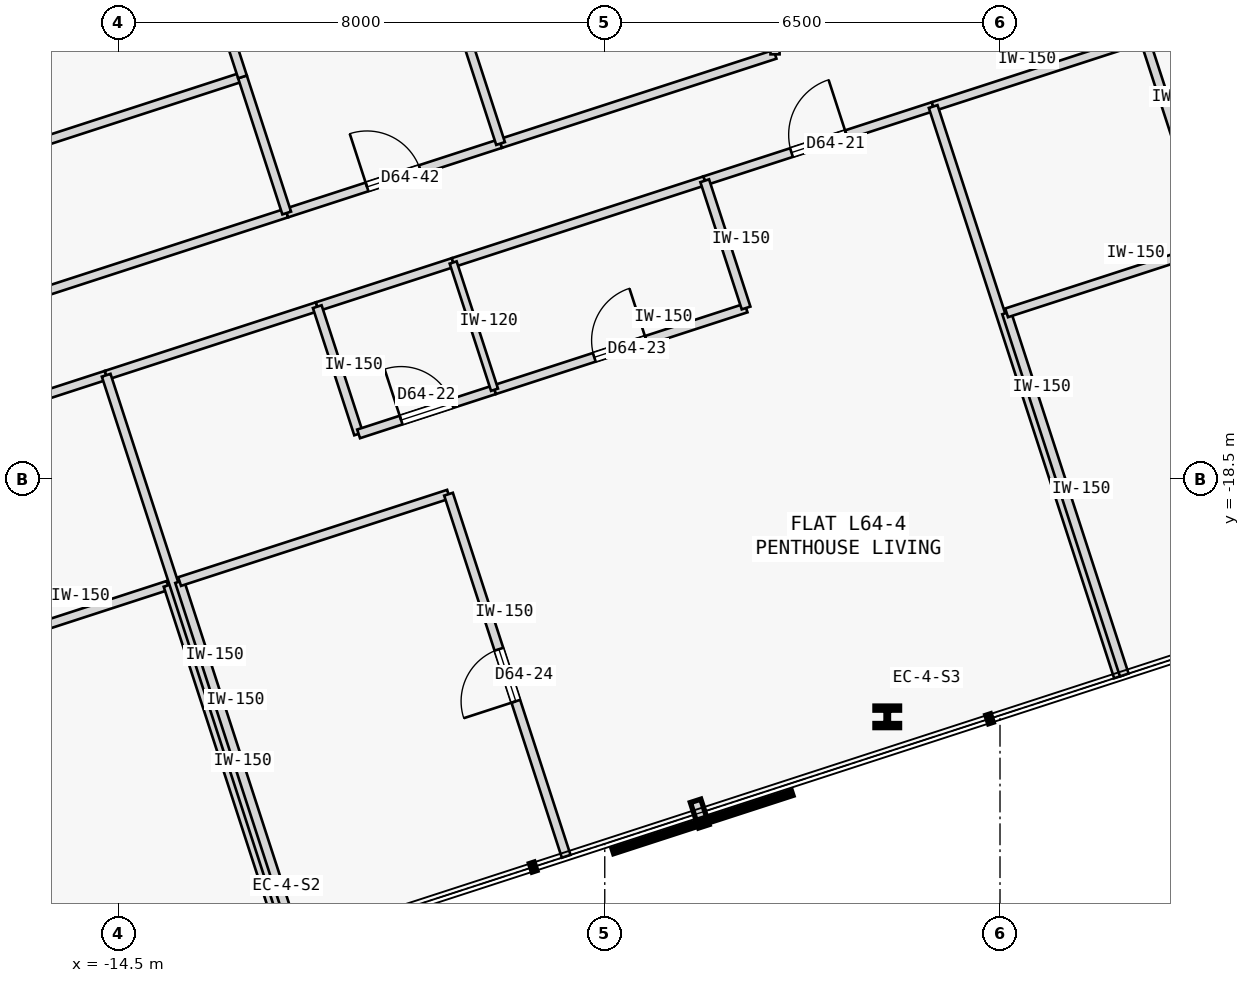
"""IFC4 building model, lengths in metres.
Left out: names, types, materials, properties, quantities, classifications, styles, units other than length and angle.
Written with IfcOpenShell. Run it as: python <this file> out.ifc"""

import sys

from ifc_helpers import new_model, si_unit, direction, frame, frame_2d, origin, origin_2d, place, context, subcontext, project, spatial, rectangle, i_section, extrude, element, fill, save


model = new_model("IFC4")
c1 = context("Model", 3, precision=1e-05, world=origin(), true_north=direction((0.0, 1.0)))
c2 = subcontext(c1, "Body", "Model", "MODEL_VIEW")
j1 = project(units=[si_unit("LENGTHUNIT", "METRE"), si_unit("PLANEANGLEUNIT", "RADIAN")], contexts=[c1])
p1 = place(None, origin())
s1 = spatial("IfcSite", under=j1, at=p1, CompositionType="ELEMENT")
p2 = place(p1, origin())
s2 = spatial("IfcBuilding", under=s1, at=p2, CompositionType="ELEMENT")
p3 = place(p2, frame((0.0, 0.0, 241.05)))
s3 = spatial("IfcBuildingStorey", under=s2, at=p3, CompositionType="ELEMENT", Elevation=241.05)
p4 = place(p3, frame((-1.854, -22.409, 0.0), z_axis=(0.0, 0.0, 1.0), x_axis=(1.0, 0.0, 0.0)))
e1 = element("IfcColumn", 1, at=p4, inside=s3, PredefinedType="COLUMN", context=c2, shape_type="SweptSolid", body=[
    extrude(i_section(OverallWidth=0.405, OverallDepth=0.355, WebThickness=0.042, FlangeThickness=0.068, FilletRadius=0.015, at=origin_2d()), origin(), (0.0, 0.0, 1.0), 3.35),
])
p5 = place(p3, frame((-18.992, -18.186, 0.0), z_axis=(0.0, 0.0, 1.0), x_axis=(0.951067846467, 0.308982121516, 0.0)))
e2 = element("IfcWall", 2, at=p5, inside=s3, PredefinedType="PARTITIONING", context=c2, shape_type="SweptSolid", body=[
    extrude(rectangle(XDim=4.514, YDim=0.15, at=frame_2d((2.257, 0.0))), origin(), (0.0, 0.0, 1.0), 3.125),
])
p6 = place(p5, frame((1.782, 0.0, 0.0)))
e3 = element("IfcOpeningElement", 3, at=p6, cuts=e2, PredefinedType="OPENING", context=c2, shape_type="SweptSolid", body=[
    extrude(rectangle(XDim=0.95, YDim=2.15, at=frame_2d((0.475, 1.075))), frame((0.0, 0.085, 0.0), z_axis=(0.0, -1.0, 0.0), x_axis=(1.0, 0.0, 0.0)), (0.0, 0.0, 1.0), 0.17),
])
p7 = place(p3, frame((-14.699, -16.791, 0.0), z_axis=(0.0, 0.0, 1.0), x_axis=(0.951050780541, 0.309034646652, 0.0)))
e4 = element("IfcWall", 4, at=p7, inside=s3, PredefinedType="PARTITIONING", context=c2, shape_type="SweptSolid", body=[
    extrude(rectangle(XDim=3.65, YDim=0.15, at=frame_2d((1.825, 0.0))), origin(), (0.0, 0.0, 1.0), 3.125),
])
p8 = place(p3, frame((-4.856, -13.593, 0.0), z_axis=(0.0, 0.0, 1.0), x_axis=(0.951054051148, 0.309024581215, 0.0)))
e5 = element("IfcWall", 5, at=p8, inside=s3, PredefinedType="PARTITIONING", context=c2, shape_type="SweptSolid", body=[
    extrude(rectangle(XDim=3.95, YDim=0.15, at=frame_2d((1.975, 0.0))), origin(), (0.0, 0.0, 1.0), 3.125),
])
p9 = place(p8, frame((1.5, 0.0, 0.0)))
e6 = element("IfcOpeningElement", 6, at=p9, cuts=e5, PredefinedType="OPENING", context=c2, shape_type="SweptSolid", body=[
    extrude(rectangle(XDim=0.95, YDim=2.15, at=frame_2d((0.475, 1.075))), frame((0.0, 0.085, 0.0), z_axis=(0.0, -1.0, 0.0), x_axis=(1.0, 0.0, 0.0)), (0.0, 0.0, 1.0), 0.17),
])
p10 = place(p3, frame((-11.228, -15.663, 0.0), z_axis=(0.0, 0.0, 1.0), x_axis=(0.951076048914, 0.308956872689, 0.0)))
e7 = element("IfcWall", 7, at=p10, inside=s3, PredefinedType="PARTITIONING", context=c2, shape_type="SweptSolid", body=[
    extrude(rectangle(XDim=2.35, YDim=0.15, at=frame_2d((1.175, 0.0))), origin(), (0.0, 0.0, 1.0), 3.125),
])
p11 = place(p3, frame((-8.993, -14.937, 0.0), z_axis=(0.0, 0.0, 1.0), x_axis=(0.951052627573, 0.309028962374, 0.0)))
e8 = element("IfcWall", 8, at=p11, inside=s3, PredefinedType="PARTITIONING", context=c2, shape_type="SweptSolid", body=[
    extrude(rectangle(XDim=4.35, YDim=0.15, at=frame_2d((2.175, 0.0))), origin(), (0.0, 0.0, 1.0), 3.125),
])
p12 = place(p3, frame((-1.099, -12.372, 0.0), z_axis=(0.0, 0.0, 1.0), x_axis=(0.951057168147, 0.309014988174, 0.0)))
e9 = element("IfcWall", 9, at=p12, inside=s3, PredefinedType="PARTITIONING", context=c2, shape_type="SweptSolid", body=[
    extrude(rectangle(XDim=3.65, YDim=0.15, at=frame_2d((1.825, 0.0))), origin(), (0.0, 0.0, 1.0), 3.125),
])
p13 = place(p3, frame((-29.45, -19.881, 0.0), z_axis=(0.0, 0.0, 1.0), x_axis=(0.95105650271, 0.309017036186, 0.0)))
e10 = element("IfcWall", 10, at=p13, inside=s3, PredefinedType="PARTITIONING", context=c2, shape_type="SweptSolid", body=[
    extrude(rectangle(XDim=18.632, YDim=0.15, at=frame_2d((9.316, 0.0))), origin(), (0.0, 0.0, 1.0), 3.125),
])
p14 = place(p13, frame((8.856, 0.0, 0.0)))
e11 = element("IfcOpeningElement", 11, at=p14, cuts=e10, PredefinedType="OPENING", context=c2, shape_type="SweptSolid", body=[
    extrude(rectangle(XDim=0.92, YDim=2.15, at=frame_2d((0.46, 1.075))), frame((0.0, 0.085, 0.0), z_axis=(0.0, -1.0, 0.0), x_axis=(1.0, 0.0, 0.0)), (0.0, 0.0, 1.0), 0.17),
])
p15 = place(p3, frame((-11.73, -14.123, 0.0), z_axis=(0.0, 0.0, 1.0), x_axis=(0.951052502763, 0.309029346483, 0.0)))
e12 = element("IfcWall", 12, at=p15, inside=s3, PredefinedType="PARTITIONING", context=c2, shape_type="SweptSolid", body=[
    extrude(rectangle(XDim=3.698, YDim=0.15, at=frame_2d((1.849, 0.0))), origin(), (0.0, 0.0, 1.0), 3.125),
])
p16 = place(p15, frame((1.389, 0.0, 0.0)))
e13 = element("IfcOpeningElement", 13, at=p16, cuts=e12, PredefinedType="OPENING", context=c2, shape_type="SweptSolid", body=[
    extrude(rectangle(XDim=0.92, YDim=2.15, at=frame_2d((0.46, 1.075))), frame((0.0, 0.085, 0.0), z_axis=(0.0, -1.0, 0.0), x_axis=(1.0, 0.0, 0.0)), (0.0, 0.0, 1.0), 0.17),
])
p17 = place(p3, frame((-8.213, -12.98, 0.0), z_axis=(0.0, 0.0, 1.0), x_axis=(0.951058260096, 0.309011627456, 0.0)))
e14 = element("IfcWall", 14, at=p17, inside=s3, PredefinedType="PARTITIONING", context=c2, shape_type="SweptSolid", body=[
    extrude(rectangle(XDim=4.746, YDim=0.15, at=frame_2d((2.373, 0.0))), origin(), (0.0, 0.0, 1.0), 3.125),
])
p18 = place(p3, frame((-3.7, -11.514, 0.0), z_axis=(0.0, 0.0, 1.0), x_axis=(-8.2572974e-05, 0.999999996591, 0.0)))
e15 = element("IfcWall", 15, at=p18, inside=s3, PredefinedType="PARTITIONING", context=c2, shape_type="SweptSolid", body=[
    extrude(rectangle(XDim=5.913, YDim=0.15, at=frame_2d((2.957, 0.0))), origin(), (0.0, 0.0, 1.0), 3.125),
])
p19 = place(p18, frame((2.497, 0.0, 0.0)))
e16 = element("IfcOpeningElement", 16, at=p19, cuts=e15, PredefinedType="OPENING", context=c2, shape_type="SweptSolid", body=[
    extrude(rectangle(XDim=0.92, YDim=2.15, at=frame_2d((0.46, 1.075))), frame((0.0, 0.085, 0.0), z_axis=(0.0, -1.0, 0.0), x_axis=(1.0, 0.0, 0.0)), (0.0, 0.0, 1.0), 0.17),
])
p20 = place(p3, frame((-18.104, -21.683, 0.0), z_axis=(0.0, 0.0, 1.0), x_axis=(0.951055286502, 0.309020779263, 0.0)))
e17 = element("IfcWall", 17, at=p20, inside=s3, PredefinedType="PARTITIONING", context=c2, shape_type="SweptSolid", body=[
    extrude(rectangle(XDim=4.65, YDim=0.15, at=frame_2d((2.325, 0.0))), origin(), (0.0, 0.0, 1.0), 3.125),
])
p21 = place(p3, frame((-11.747, -26.201, 0.0), z_axis=(0.0, 0.0, 1.0), x_axis=(-0.309013782848, 0.951057559777, 0.0)))
e18 = element("IfcWall", 18, at=p21, inside=s3, PredefinedType="PARTITIONING", context=c2, shape_type="SweptSolid", body=[
    extrude(rectangle(XDim=6.262, YDim=0.15, at=frame_2d((3.131, 0.0))), origin(), (0.0, 0.0, 1.0), 3.125),
])
p22 = place(p3, frame((-11.652, -26.17, 0.0), z_axis=(0.0, 0.0, 1.0), x_axis=(-0.308999867152, 0.951062081097, 0.0)))
e19 = element("IfcWall", 19, at=p22, inside=s3, PredefinedType="PARTITIONING", context=c2, shape_type="SweptSolid", body=[
    extrude(rectangle(XDim=9.862, YDim=0.15, at=frame_2d((4.931, 0.0))), origin(), (0.0, 0.0, 1.0), 3.125),
])
p23 = place(p3, frame((-10.548, -17.755, 0.0), z_axis=(0.0, 0.0, 1.0), x_axis=(-0.309060979314, 0.951042223598, 0.0)))
e20 = element("IfcWall", 20, at=p23, inside=s3, PredefinedType="PARTITIONING", context=c2, shape_type="SweptSolid", body=[
    extrude(rectangle(XDim=2.2, YDim=0.15, at=frame_2d((1.1, 0.0))), origin(), (0.0, 0.0, 1.0), 3.125),
])
p24 = place(p3, frame((-10.548, -17.755, 0.0), z_axis=(0.0, 0.0, 1.0), x_axis=(0.951076048914, 0.308956872689, 0.0)))
e21 = element("IfcWall", 21, at=p24, inside=s3, PredefinedType="PARTITIONING", context=c2, shape_type="SweptSolid", body=[
    extrude(rectangle(XDim=2.35, YDim=0.15, at=frame_2d((1.175, 0.0))), origin(), (0.0, 0.0, 1.0), 3.125),
])
p25 = place(p24, frame((0.735, 0.0, 0.0)))
e22 = element("IfcOpeningElement", 22, at=p25, cuts=e21, PredefinedType="OPENING", context=c2, shape_type="SweptSolid", body=[
    extrude(rectangle(XDim=0.88, YDim=2.15, at=frame_2d((0.44, 1.075))), frame((0.0, 0.085, 0.0), z_axis=(0.0, -1.0, 0.0), x_axis=(1.0, 0.0, 0.0)), (0.0, 0.0, 1.0), 0.17),
])
p26 = place(p3, frame((-8.313, -17.029, 0.0), z_axis=(0.0, 0.0, 1.0), x_axis=(0.951052627573, 0.309028962374, 0.0)))
e23 = element("IfcWall", 23, at=p26, inside=s3, PredefinedType="PARTITIONING", context=c2, shape_type="SweptSolid", body=[
    extrude(rectangle(XDim=4.35, YDim=0.15, at=frame_2d((2.175, 0.0))), origin(), (0.0, 0.0, 1.0), 3.125),
])
p27 = place(p26, frame((1.725, 0.0, 0.0)))
e24 = element("IfcOpeningElement", 24, at=p27, cuts=e23, PredefinedType="OPENING", context=c2, shape_type="SweptSolid", body=[
    extrude(rectangle(XDim=0.9, YDim=2.15, at=frame_2d((0.45, 1.075))), frame((0.0, 0.085, 0.0), z_axis=(0.0, -1.0, 0.0), x_axis=(1.0, 0.0, 0.0)), (0.0, 0.0, 1.0), 0.17),
])
p28 = place(p3, frame((-4.176, -15.685, 0.0), z_axis=(0.0, 0.0, 1.0), x_axis=(-0.309060979314, 0.951042223598, 0.0)))
e25 = element("IfcWall", 25, at=p28, inside=s3, PredefinedType="PARTITIONING", context=c2, shape_type="SweptSolid", body=[
    extrude(rectangle(XDim=2.2, YDim=0.15, at=frame_2d((1.1, 0.0))), origin(), (0.0, 0.0, 1.0), 3.125),
])
p29 = place(p3, frame((-11.557, -26.139, 0.0), z_axis=(0.0, 0.0, 1.0), x_axis=(-0.309013782848, 0.951057559777, 0.0)))
e26 = element("IfcWall", 26, at=p29, inside=s3, PredefinedType="PARTITIONING", context=c2, shape_type="SweptSolid", body=[
    extrude(rectangle(XDim=6.262, YDim=0.15, at=frame_2d((3.131, 0.0))), origin(), (0.0, 0.0, 1.0), 3.125),
])
p30 = place(p3, frame((-13.492, -20.184, 0.0), z_axis=(0.0, 0.0, 1.0), x_axis=(0.951065702951, 0.308988719326, 0.0)))
e27 = element("IfcWall", 27, at=p30, inside=s3, PredefinedType="PARTITIONING", context=c2, shape_type="SweptSolid", body=[
    extrude(rectangle(XDim=4.65, YDim=0.15, at=frame_2d((2.325, 0.0))), origin(), (0.0, 0.0, 1.0), 3.125),
])
p31 = place(p3, frame((-7.134, -24.702, 0.0), z_axis=(0.0, 0.0, 1.0), x_axis=(-0.30902524124, 0.951053836687, 0.0)))
e28 = element("IfcWall", 28, at=p31, inside=s3, PredefinedType="PARTITIONING", context=c2, shape_type="SweptSolid", body=[
    extrude(rectangle(XDim=6.262, YDim=0.15, at=frame_2d((3.131, 0.0))), origin(), (0.0, 0.0, 1.0), 3.125),
])
p32 = place(p31, frame((2.681, 0.0, 0.0)))
e29 = element("IfcOpeningElement", 29, at=p32, cuts=e28, PredefinedType="OPENING", context=c2, shape_type="SweptSolid", body=[
    extrude(rectangle(XDim=0.9, YDim=2.15, at=frame_2d((0.45, 1.075))), frame((0.0, 0.085, 0.0), z_axis=(0.0, -1.0, 0.0), x_axis=(1.0, 0.0, 0.0)), (0.0, 0.0, 1.0), 0.17),
])
p33 = place(p3, frame((1.948, -21.751, 0.0), z_axis=(0.0, 0.0, 1.0), x_axis=(-0.308999867152, 0.951062081097, 0.0)))
e30 = element("IfcWall", 30, at=p33, inside=s3, PredefinedType="PARTITIONING", context=c2, shape_type="SweptSolid", body=[
    extrude(rectangle(XDim=9.862, YDim=0.15, at=frame_2d((4.931, 0.0))), origin(), (0.0, 0.0, 1.0), 3.125),
])
p34 = place(p3, frame((-8.313, -17.029, 0.0), z_axis=(0.0, 0.0, 1.0), x_axis=(-0.309060979314, 0.951042223598, 0.0)))
e31 = element("IfcWall", 31, at=p34, inside=s3, PredefinedType="PARTITIONING", context=c2, shape_type="SweptSolid", body=[
    extrude(rectangle(XDim=2.2, YDim=0.12, at=frame_2d((1.1, 0.0))), origin(), (0.0, 0.0, 1.0), 3.125),
])
p35 = place(p3, frame((3.052, -13.336, 0.0), z_axis=(0.0, 0.0, 1.0), x_axis=(-0.308960600764, 0.951074837842, 0.0)))
e32 = element("IfcWall", 32, at=p35, inside=s3, PredefinedType="PARTITIONING", context=c2, shape_type="SweptSolid", body=[
    extrude(rectangle(XDim=2.2, YDim=0.15, at=frame_2d((1.1, 0.0))), origin(), (0.0, 0.0, 1.0), 3.125),
])
p36 = place(p3, frame((2.043, -21.72, 0.0), z_axis=(0.0, 0.0, 1.0), x_axis=(-0.309013782848, 0.951057559777, 0.0)))
e33 = element("IfcWall", 33, at=p36, inside=s3, PredefinedType="PARTITIONING", context=c2, shape_type="SweptSolid", body=[
    extrude(rectangle(XDim=6.262, YDim=0.15, at=frame_2d((3.131, 0.0))), origin(), (0.0, 0.0, 1.0), 3.125),
])
p37 = place(p3, frame((0.108, -15.765, 0.0), z_axis=(0.0, 0.0, 1.0), x_axis=(0.951065702951, 0.308988719326, 0.0)))
e34 = element("IfcWall", 34, at=p37, inside=s3, PredefinedType="PARTITIONING", context=c2, shape_type="SweptSolid", body=[
    extrude(rectangle(XDim=4.65, YDim=0.15, at=frame_2d((2.325, 0.0))), origin(), (0.0, 0.0, 1.0), 3.125),
])
p38 = place(p3, frame((-30.178, -17.642, 0.0), z_axis=(0.0, 0.0, 1.0), x_axis=(0.95105650271, 0.309017036186, 0.0)))
e35 = element("IfcWall", 35, at=p38, inside=s3, PredefinedType="PARTITIONING", context=c2, shape_type="SweptSolid", body=[
    extrude(rectangle(XDim=18.632, YDim=0.15, at=frame_2d((9.316, 0.0))), origin(), (0.0, 0.0, 1.0), 3.125),
])
p39 = place(p38, frame((8.856, 0.0, 0.0)))
e36 = element("IfcOpeningElement", 36, at=p39, cuts=e35, PredefinedType="OPENING", context=c2, shape_type="SweptSolid", body=[
    extrude(rectangle(XDim=0.92, YDim=2.15, at=frame_2d((0.46, 1.075))), frame((0.0, 0.085, 0.0), z_axis=(0.0, -1.0, 0.0), x_axis=(1.0, 0.0, 0.0)), (0.0, 0.0, 1.0), 0.17),
])
p40 = place(p3, frame((-11.73, -14.123, 0.0), z_axis=(0.0, 0.0, 1.0), x_axis=(-0.309062621189, 0.951041690035, 0.0)))
e37 = element("IfcWall", 37, at=p40, inside=s3, PredefinedType="PARTITIONING", context=c2, shape_type="SweptSolid", body=[
    extrude(rectangle(XDim=2.354, YDim=0.15, at=frame_2d((1.177, 0.0))), origin(), (0.0, 0.0, 1.0), 3.125),
])
p41 = place(p3, frame((-31.208, -14.471, 0.0), z_axis=(0.0, 0.0, 1.0), x_axis=(0.951057753948, 0.309013185244, 0.0)))
e38 = element("IfcWall", 38, at=p41, inside=s3, PredefinedType="PARTITIONING", context=c2, shape_type="SweptSolid", body=[
    extrude(rectangle(XDim=18.632, YDim=0.15, at=frame_2d((9.316, 0.0))), origin(), (0.0, 0.0, 1.0), 3.125),
])
p42 = place(p3, frame((-12.458, -11.884, 0.0), z_axis=(0.0, 0.0, 1.0), x_axis=(-0.308946982245, 0.951079261766, 0.0)))
e39 = element("IfcWall", 39, at=p42, inside=s3, PredefinedType="PARTITIONING", context=c2, shape_type="SweptSolid", body=[
    extrude(rectangle(XDim=3.334, YDim=0.15, at=frame_2d((1.667, 0.0))), origin(), (0.0, 0.0, 1.0), 3.125),
])
p43 = place(p3, frame((-8.213, -12.98, 0.0), z_axis=(0.0, 0.0, 1.0), x_axis=(-0.309017065592, 0.951056493155, 0.0)))
e40 = element("IfcWall", 40, at=p43, inside=s3, PredefinedType="PARTITIONING", context=c2, shape_type="SweptSolid", body=[
    extrude(rectangle(XDim=7.76, YDim=0.15, at=frame_2d((3.88, 0.0))), origin(), (0.0, 0.0, 1.0), 3.125),
])
p44 = place(p9, origin())
e41 = element("IfcDoor", 41, at=p44, inside=s3, OperationType="SINGLE_SWING_RIGHT", PredefinedType="DOOR", context=c2, shape_type="SweptSolid", body=[
    extrude(rectangle(XDim=0.95, YDim=2.15, at=frame_2d((0.475, 1.075))), frame((0.0, 0.025, 0.0), z_axis=(0.0, -1.0, 0.0), x_axis=(1.0, 0.0, 0.0)), (0.0, 0.0, 1.0), 0.05),
])
fill(e6, e41)
p45 = place(p25, origin())
e42 = element("IfcDoor", 42, at=p45, inside=s3, OperationType="SINGLE_SWING_LEFT", PredefinedType="DOOR", context=c2, shape_type="SweptSolid", body=[
    extrude(rectangle(XDim=0.88, YDim=2.15, at=frame_2d((0.44, 1.075))), frame((0.0, 0.025, 0.0), z_axis=(0.0, -1.0, 0.0), x_axis=(1.0, 0.0, 0.0)), (0.0, 0.0, 1.0), 0.05),
])
fill(e22, e42)
p46 = place(p27, origin())
e43 = element("IfcDoor", 43, at=p46, inside=s3, OperationType="SINGLE_SWING_RIGHT", PredefinedType="DOOR", context=c2, shape_type="SweptSolid", body=[
    extrude(rectangle(XDim=0.9, YDim=2.15, at=frame_2d((0.45, 1.075))), frame((0.0, 0.025, 0.0), z_axis=(0.0, -1.0, 0.0), x_axis=(1.0, 0.0, 0.0)), (0.0, 0.0, 1.0), 0.05),
])
fill(e24, e43)
p47 = place(p32, origin())
e44 = element("IfcDoor", 44, at=p47, inside=s3, OperationType="SINGLE_SWING_LEFT", PredefinedType="DOOR", context=c2, shape_type="SweptSolid", body=[
    extrude(rectangle(XDim=0.9, YDim=2.15, at=frame_2d((0.45, 1.075))), frame((0.0, 0.025, 0.0), z_axis=(0.0, -1.0, 0.0), x_axis=(1.0, 0.0, 0.0)), (0.0, 0.0, 1.0), 0.05),
])
fill(e29, e44)
p48 = place(p16, origin())
e45 = element("IfcDoor", 45, at=p48, inside=s3, OperationType="SINGLE_SWING_LEFT", PredefinedType="DOOR", context=c2, shape_type="SweptSolid", body=[
    extrude(rectangle(XDim=0.92, YDim=2.15, at=frame_2d((0.46, 1.075))), frame((0.0, 0.025, 0.0), z_axis=(0.0, -1.0, 0.0), x_axis=(1.0, 0.0, 0.0)), (0.0, 0.0, 1.0), 0.05),
])
fill(e13, e45)
save(model, sys.argv[1])
